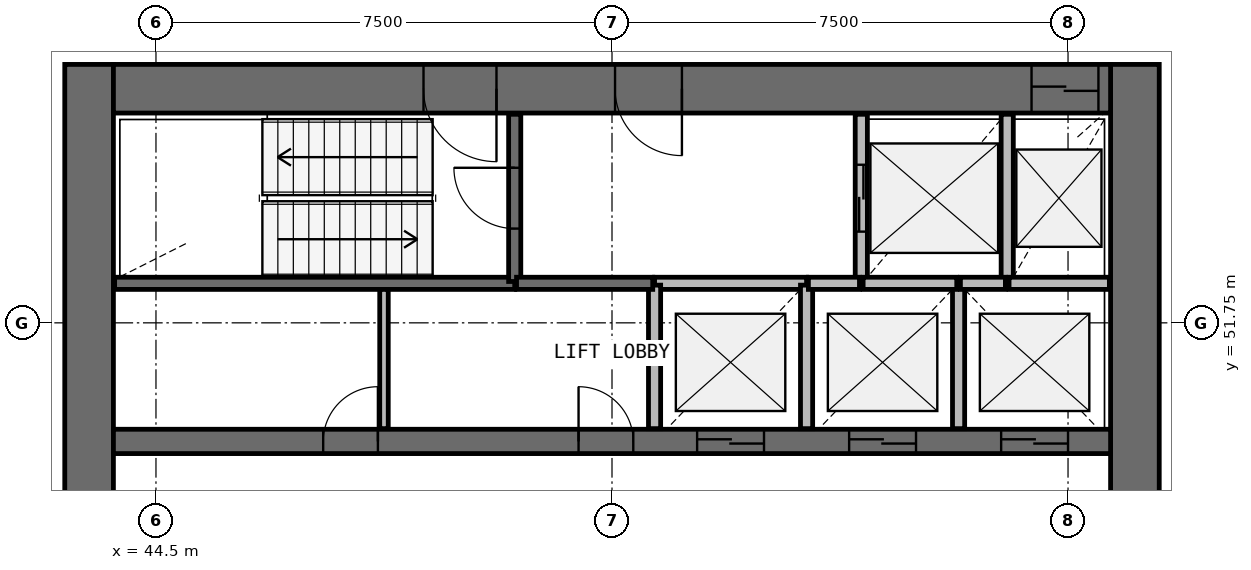
"""IFC4 building model, lengths in metres.
Left out: names, types, materials, properties, quantities, classifications, styles, units other than length and angle.
Written with IfcOpenShell. Run it as: python <this file> out.ifc"""

import sys

from ifc_helpers import new_model, si_unit, direction, frame, frame_2d, origin, place, context, subcontext, project, spatial, rectangle, extrude, source, transform, mapped, element, fill, save


model = new_model("IFC4")
c1 = context("Model", 3, precision=1e-05, world=origin(), true_north=direction((0.0, 1.0)))
c2 = subcontext(c1, "Body", "Model", "MODEL_VIEW")
j1 = project(units=[si_unit("LENGTHUNIT", "METRE"), si_unit("PLANEANGLEUNIT", "RADIAN")], contexts=[c1])
p1 = place(None, origin())
s1 = spatial("IfcSite", under=j1, at=p1, CompositionType="ELEMENT")
p2 = place(p1, origin())
s2 = spatial("IfcBuilding", under=s1, at=p2, CompositionType="ELEMENT")
p3 = place(p2, frame((0.0, 0.0, 156.5)))
s3 = spatial("IfcBuildingStorey", under=s2, at=p3, CompositionType="ELEMENT", Elevation=156.5)
p4 = place(p3, frame((60.6, 40.0, 0.0), z_axis=(0.0, 0.0, 1.0), x_axis=(0.0, 1.0, 0.0)))
e1 = element("IfcWall", 1, at=p4, inside=s3, PredefinedType="SHEAR", context=c2, shape_type="SweptSolid", body=[
    extrude(rectangle(XDim=16.0, YDim=0.8, at=frame_2d((8.0, 0.0))), origin(), (0.0, 0.0, 1.0), 3.9),
])
p5 = place(p4, frame((7.1, 0.0, 0.0)))
e2 = element("IfcOpeningElement", 2, at=p5, cuts=e1, PredefinedType="OPENING", context=c2, shape_type="SweptSolid", body=[
    extrude(rectangle(XDim=1.8, YDim=2.1, at=frame_2d((0.9, 1.05))), frame((0.0, 0.41, 0.0), z_axis=(0.0, -1.0, 0.0), x_axis=(1.0, 0.0, 0.0)), (0.0, 0.0, 1.0), 0.82),
])
p6 = place(p3, frame((43.4, 56.0, 0.0), z_axis=(0.0, 0.0, 1.0), x_axis=(0.0, -1.0, 0.0)))
e3 = element("IfcWall", 3, at=p6, inside=s3, PredefinedType="SHEAR", context=c2, shape_type="SweptSolid", body=[
    extrude(rectangle(XDim=16.0, YDim=0.8, at=frame_2d((8.0, 0.0))), origin(), (0.0, 0.0, 1.0), 3.9),
])
p7 = place(p6, frame((7.1, 0.0, 0.0)))
e4 = element("IfcOpeningElement", 4, at=p7, cuts=e3, PredefinedType="OPENING", context=c2, shape_type="SweptSolid", body=[
    extrude(rectangle(XDim=1.8, YDim=2.1, at=frame_2d((0.9, 1.05))), frame((0.0, 0.41, 0.0), z_axis=(0.0, -1.0, 0.0), x_axis=(1.0, 0.0, 0.0)), (0.0, 0.0, 1.0), 0.82),
])
p8 = place(p3, frame((60.2, 55.6, 0.0), z_axis=(0.0, 0.0, 1.0), x_axis=(-1.0, 0.0, 0.0)))
e5 = element("IfcWall", 5, at=p8, inside=s3, PredefinedType="SHEAR", context=c2, shape_type="SweptSolid", body=[
    extrude(rectangle(XDim=16.4, YDim=0.8, at=frame_2d((8.2, 0.0))), origin(), (0.0, 0.0, 1.0), 3.9),
])
p9 = place(p8, frame((0.2, 0.0, 0.0)))
e6 = element("IfcOpeningElement", 6, at=p9, cuts=e5, PredefinedType="OPENING", context=c2, shape_type="SweptSolid", body=[
    extrude(rectangle(XDim=1.1, YDim=2.1, at=frame_2d((0.55, 1.05))), frame((0.0, 0.41, 0.0), z_axis=(0.0, -1.0, 0.0), x_axis=(1.0, 0.0, 0.0)), (0.0, 0.0, 1.0), 0.82),
])
p10 = place(p8, frame((10.1, 0.0, 0.0)))
e7 = element("IfcOpeningElement", 7, at=p10, cuts=e5, PredefinedType="OPENING", context=c2, shape_type="SweptSolid", body=[
    extrude(rectangle(XDim=1.2, YDim=2.1, at=frame_2d((0.6, 1.05))), frame((0.0, 0.41, 0.0), z_axis=(0.0, -1.0, 0.0), x_axis=(1.0, 0.0, 0.0)), (0.0, 0.0, 1.0), 0.82),
])
p11 = place(p8, frame((7.05, 0.0, 0.0)))
e8 = element("IfcOpeningElement", 8, at=p11, cuts=e5, PredefinedType="OPENING", context=c2, shape_type="SweptSolid", body=[
    extrude(rectangle(XDim=1.1, YDim=2.1, at=frame_2d((0.55, 1.05))), frame((0.0, 0.41, 0.0), z_axis=(0.0, -1.0, 0.0), x_axis=(1.0, 0.0, 0.0)), (0.0, 0.0, 1.0), 0.82),
])
p12 = place(p3, frame((43.8, 49.8, 0.0), z_axis=(0.0, 0.0, 1.0), x_axis=(1.0, 0.0, 0.0)))
e9 = element("IfcWall", 9, at=p12, inside=s3, PredefinedType="SHEAR", context=c2, shape_type="SweptSolid", body=[
    extrude(rectangle(XDim=16.4, YDim=0.4, at=frame_2d((8.2, 0.0))), origin(), (0.0, 0.0, 1.0), 3.9),
])
p13 = place(p12, frame((9.6, 0.0, 0.0)))
e10 = element("IfcOpeningElement", 10, at=p13, cuts=e9, PredefinedType="OPENING", context=c2, shape_type="SweptSolid", body=[
    extrude(rectangle(XDim=1.1, YDim=2.1, at=frame_2d((0.55, 1.05))), frame((0.0, 0.21, 0.0), z_axis=(0.0, -1.0, 0.0), x_axis=(1.0, 0.0, 0.0)), (0.0, 0.0, 1.0), 0.42),
])
p14 = place(p12, frame((12.1, 0.0, 0.0)))
e11 = element("IfcOpeningElement", 11, at=p14, cuts=e9, PredefinedType="OPENING", context=c2, shape_type="SweptSolid", body=[
    extrude(rectangle(XDim=1.1, YDim=2.1, at=frame_2d((0.55, 1.05))), frame((0.0, 0.21, 0.0), z_axis=(0.0, -1.0, 0.0), x_axis=(1.0, 0.0, 0.0)), (0.0, 0.0, 1.0), 0.42),
])
p15 = place(p12, frame((14.6, 0.0, 0.0)))
e12 = element("IfcOpeningElement", 12, at=p15, cuts=e9, PredefinedType="OPENING", context=c2, shape_type="SweptSolid", body=[
    extrude(rectangle(XDim=1.1, YDim=2.1, at=frame_2d((0.55, 1.05))), frame((0.0, 0.21, 0.0), z_axis=(0.0, -1.0, 0.0), x_axis=(1.0, 0.0, 0.0)), (0.0, 0.0, 1.0), 0.42),
])
p16 = place(p12, frame((3.45, 0.0, 0.0)))
e13 = element("IfcOpeningElement", 13, at=p16, cuts=e9, PredefinedType="OPENING", context=c2, shape_type="SweptSolid", body=[
    extrude(rectangle(XDim=0.9, YDim=2.1, at=frame_2d((0.45, 1.05))), frame((0.0, 0.21, 0.0), z_axis=(0.0, -1.0, 0.0), x_axis=(1.0, 0.0, 0.0)), (0.0, 0.0, 1.0), 0.42),
])
p17 = place(p12, frame((7.65, 0.0, 0.0)))
e14 = element("IfcOpeningElement", 14, at=p17, cuts=e9, PredefinedType="OPENING", context=c2, shape_type="SweptSolid", body=[
    extrude(rectangle(XDim=0.9, YDim=2.1, at=frame_2d((0.45, 1.05))), frame((0.0, 0.21, 0.0), z_axis=(0.0, -1.0, 0.0), x_axis=(1.0, 0.0, 0.0)), (0.0, 0.0, 1.0), 0.42),
])
p18 = place(p3, frame((43.82, 52.4, 0.0), z_axis=(0.0, 0.0, 1.0), x_axis=(1.0, 0.0, 0.0)))
e15 = element("IfcWall", 15, at=p18, inside=s3, PredefinedType="SOLIDWALL", context=c2, shape_type="SweptSolid", body=[
    extrude(rectangle(XDim=6.58, YDim=0.2, at=frame_2d((3.29, 0.0))), origin(), (0.0, 0.0, 1.0), 3.58),
])
p19 = place(p3, frame((50.4, 52.43, 0.0), z_axis=(0.0, 0.0, 1.0), x_axis=(0.0, 1.0, 0.0)))
e16 = element("IfcWall", 16, at=p19, inside=s3, PredefinedType="SOLIDWALL", context=c2, shape_type="SweptSolid", body=[
    extrude(rectangle(XDim=2.75, YDim=0.2, at=frame_2d((1.375, 0.0))), origin(), (0.0, 0.0, 1.0), 3.58),
])
p20 = place(p19, frame((0.87, 0.0, 0.0)))
e17 = element("IfcOpeningElement", 17, at=p20, cuts=e16, PredefinedType="OPENING", context=c2, shape_type="SweptSolid", body=[
    extrude(rectangle(XDim=1.0, YDim=2.1, at=frame_2d((0.5, 1.05))), frame((0.0, 0.11, 0.0), z_axis=(0.0, -1.0, 0.0), x_axis=(1.0, 0.0, 0.0)), (0.0, 0.0, 1.0), 0.22),
])
p21 = place(p3, frame((56.1, 55.18, 0.0), z_axis=(0.0, 0.0, 1.0), x_axis=(0.0, -1.0, 0.0)))
e18 = element("IfcWall", 18, at=p21, inside=s3, PredefinedType="SOLIDWALL", context=c2, shape_type="SweptSolid", body=[
    extrude(rectangle(XDim=2.78, YDim=0.2, at=frame_2d((1.39, 0.0))), origin(), (0.0, 0.0, 1.0), 3.58),
])
p22 = place(p21, frame((0.83, 0.0, 0.0)))
e19 = element("IfcOpeningElement", 19, at=p22, cuts=e18, PredefinedType="OPENING", context=c2, shape_type="SweptSolid", body=[
    extrude(rectangle(XDim=1.1, YDim=2.1, at=frame_2d((0.55, 1.05))), frame((0.0, 0.11, 0.0), z_axis=(0.0, -1.0, 0.0), x_axis=(1.0, 0.0, 0.0)), (0.0, 0.0, 1.0), 0.22),
])
p23 = place(p3, frame((58.5, 52.4, 0.0), z_axis=(0.0, 0.0, 1.0), x_axis=(0.0, 1.0, 0.0)))
e20 = element("IfcWall", 20, at=p23, inside=s3, PredefinedType="SOLIDWALL", context=c2, shape_type="SweptSolid", body=[
    extrude(rectangle(XDim=2.78, YDim=0.2, at=frame_2d((1.39, 0.0))), origin(), (0.0, 0.0, 1.0), 3.58),
])
p24 = place(p3, frame((55.2, 52.4, 0.0), z_axis=(0.0, 0.0, 1.0), x_axis=(-1.0, 0.0, 0.0)))
e21 = element("IfcWall", 21, at=p24, inside=s3, PredefinedType="SOLIDWALL", context=c2, shape_type="SweptSolid", body=[
    extrude(rectangle(XDim=2.5, YDim=0.2, at=frame_2d((1.25, 0.0))), origin(), (0.0, 0.0, 1.0), 3.58),
])
for number, where, z_axis, x_axis in (
    (22, (52.7, 52.37, 0.0), (0.0, 0.0, 1.0), (0.0, -1.0, 0.0)),
    (23, (55.2, 50.01, 0.0), (0.0, 0.0, 1.0), (0.0, 1.0, 0.0)),
):
    element("IfcWall", number, at=place(p3, frame(where, z_axis=z_axis, x_axis=x_axis)), inside=s3, PredefinedType="SOLIDWALL", context=c2, shape_type="SweptSolid", body=[
        extrude(rectangle(XDim=2.36, YDim=0.2, at=frame_2d((1.18, 0.0))), origin(), (0.0, 0.0, 1.0), 3.58),
    ])
p25 = place(p3, frame((57.7, 50.01, 0.0), z_axis=(0.0, 0.0, 1.0), x_axis=(0.0, 1.0, 0.0)))
e24 = element("IfcWall", 24, at=p25, inside=s3, PredefinedType="SOLIDWALL", context=c2, shape_type="SweptSolid", body=[
    extrude(rectangle(XDim=2.39, YDim=0.2, at=frame_2d((1.195, 0.0))), origin(), (0.0, 0.0, 1.0), 3.58),
])
p26 = place(p3, frame((50.43, 52.4, 0.0), z_axis=(0.0, 0.0, 1.0), x_axis=(1.0, 0.0, 0.0)))
e25 = element("IfcWall", 25, at=p26, inside=s3, PredefinedType="SOLIDWALL", context=c2, shape_type="SweptSolid", body=[
    extrude(rectangle(XDim=2.24, YDim=0.2, at=frame_2d((1.12, 0.0))), origin(), (0.0, 0.0, 1.0), 3.58),
])
p27 = place(p3, frame((60.18, 52.4, 0.0), z_axis=(0.0, 0.0, 1.0), x_axis=(-1.0, 0.0, 0.0)))
e26 = element("IfcWall", 26, at=p27, inside=s3, PredefinedType="SOLIDWALL", context=c2, shape_type="SweptSolid", body=[
    extrude(rectangle(XDim=1.65, YDim=0.2, at=frame_2d((0.825, 0.0))), origin(), (0.0, 0.0, 1.0), 3.58),
])
p28 = place(p3, frame((57.67, 52.4, 0.0), z_axis=(0.0, 0.0, 1.0), x_axis=(-1.0, 0.0, 0.0)))
e27 = element("IfcWall", 27, at=p28, inside=s3, PredefinedType="SOLIDWALL", context=c2, shape_type="SweptSolid", body=[
    extrude(rectangle(XDim=1.54, YDim=0.2, at=frame_2d((0.77, 0.0))), origin(), (0.0, 0.0, 1.0), 3.58),
])
p29 = place(p3, frame((56.07, 52.4, 0.0), z_axis=(0.0, 0.0, 1.0), x_axis=(-1.0, 0.0, 0.0)))
e28 = element("IfcWall", 28, at=p29, inside=s3, PredefinedType="SOLIDWALL", context=c2, shape_type="SweptSolid", body=[
    extrude(rectangle(XDim=0.84, YDim=0.2, at=frame_2d((0.42, 0.0))), origin(), (0.0, 0.0, 1.0), 3.58),
])
p30 = place(p3, frame((58.47, 52.4, 0.0), z_axis=(0.0, 0.0, 1.0), x_axis=(-1.0, 0.0, 0.0)))
e29 = element("IfcWall", 29, at=p30, inside=s3, PredefinedType="SOLIDWALL", context=c2, shape_type="SweptSolid", body=[
    extrude(rectangle(XDim=0.74, YDim=0.2, at=frame_2d((0.37, 0.0))), origin(), (0.0, 0.0, 1.0), 3.58),
])
p31 = place(p3, frame((48.25, 50.01, 0.0), z_axis=(0.0, 0.0, 1.0), x_axis=(0.0, 1.0, 0.0)))
e30 = element("IfcWall", 30, at=p31, inside=s3, PredefinedType="PARTITIONING", context=c2, shape_type="SweptSolid", body=[
    extrude(rectangle(XDim=2.29, YDim=0.14, at=frame_2d((1.145, 0.0))), origin(), (0.0, 0.0, 1.0), 2.88),
])
m1 = source(origin(), c2, "Body", "SweptSolid", [
    extrude(rectangle(XDim=1.1, YDim=2.1, at=frame_2d((0.55, 1.05))), frame((0.0, 0.025, 0.0), z_axis=(0.0, -1.0, 0.0), x_axis=(1.0, 0.0, 0.0)), (0.0, 0.0, 1.0), 0.05),
])
p32 = place(p13, origin())
e31 = element("IfcDoor", 31, at=p32, inside=s3, OperationType="DOUBLE_DOOR_SLIDING", PredefinedType="USERDEFINED", context=c2, shape_type="MappedRepresentation", body=[
    mapped(m1, transform((0.0, 0.0, 0.0), scale=1.0)),
])
fill(e10, e31)
p33 = place(p14, origin())
e32 = element("IfcDoor", 32, at=p33, inside=s3, OperationType="DOUBLE_DOOR_SLIDING", PredefinedType="USERDEFINED", context=c2, shape_type="MappedRepresentation", body=[
    mapped(m1, transform((0.0, 0.0, 0.0), scale=1.0)),
])
fill(e11, e32)
p34 = place(p15, origin())
e33 = element("IfcDoor", 33, at=p34, inside=s3, OperationType="DOUBLE_DOOR_SLIDING", PredefinedType="USERDEFINED", context=c2, shape_type="MappedRepresentation", body=[
    mapped(m1, transform((0.0, 0.0, 0.0), scale=1.0)),
])
fill(e12, e33)
p35 = place(p22, origin())
e34 = element("IfcDoor", 34, at=p35, inside=s3, OperationType="DOUBLE_DOOR_SLIDING", PredefinedType="USERDEFINED", context=c2, shape_type="MappedRepresentation", body=[
    mapped(m1, transform((0.0, 0.0, 0.0), scale=1.0)),
])
fill(e19, e34)
p36 = place(p9, origin())
e35 = element("IfcDoor", 35, at=p36, inside=s3, OperationType="DOUBLE_DOOR_SLIDING", PredefinedType="USERDEFINED", context=c2, shape_type="MappedRepresentation", body=[
    mapped(m1, transform((0.0, 0.0, 0.0), scale=1.0)),
])
fill(e6, e35)
m2 = source(origin(), c2, "Body", "SweptSolid", [
    extrude(rectangle(XDim=1.2, YDim=2.1, at=frame_2d((0.6, 1.05))), frame((0.0, 0.025, 0.0), z_axis=(0.0, -1.0, 0.0), x_axis=(1.0, 0.0, 0.0)), (0.0, 0.0, 1.0), 0.05),
])
p37 = place(p10, origin())
e36 = element("IfcDoor", 36, at=p37, inside=s3, OperationType="SINGLE_SWING_LEFT", PredefinedType="DOOR", context=c2, shape_type="MappedRepresentation", body=[
    mapped(m2, transform((0.0, 0.0, 0.0), scale=1.0)),
])
fill(e7, e36)
m3 = source(origin(), c2, "Body", "SweptSolid", [
    extrude(rectangle(XDim=1.0, YDim=2.1, at=frame_2d((0.5, 1.05))), frame((0.0, 0.025, 0.0), z_axis=(0.0, -1.0, 0.0), x_axis=(1.0, 0.0, 0.0)), (0.0, 0.0, 1.0), 0.05),
])
p38 = place(p20, origin())
e37 = element("IfcDoor", 37, at=p38, inside=s3, OperationType="SINGLE_SWING_RIGHT", PredefinedType="DOOR", context=c2, shape_type="MappedRepresentation", body=[
    mapped(m3, transform((0.0, 0.0, 0.0), scale=1.0)),
])
fill(e17, e37)
m4 = source(origin(), c2, "Body", "SweptSolid", [
    extrude(rectangle(XDim=1.1, YDim=2.1, at=frame_2d((0.55, 1.05))), frame((0.0, 0.025, 0.0), z_axis=(0.0, -1.0, 0.0), x_axis=(1.0, 0.0, 0.0)), (0.0, 0.0, 1.0), 0.05),
])
p39 = place(p11, origin())
e38 = element("IfcDoor", 38, at=p39, inside=s3, OperationType="SINGLE_SWING_LEFT", PredefinedType="DOOR", context=c2, shape_type="MappedRepresentation", body=[
    mapped(m4, transform((0.0, 0.0, 0.0), scale=1.0)),
])
fill(e8, e38)
m5 = source(origin(), c2, "Body", "SweptSolid", [
    extrude(rectangle(XDim=0.9, YDim=2.1, at=frame_2d((0.45, 1.05))), frame((0.0, 0.025, 0.0), z_axis=(0.0, -1.0, 0.0), x_axis=(1.0, 0.0, 0.0)), (0.0, 0.0, 1.0), 0.05),
])
p40 = place(p16, origin())
e39 = element("IfcDoor", 39, at=p40, inside=s3, OperationType="SINGLE_SWING_RIGHT", PredefinedType="DOOR", context=c2, shape_type="MappedRepresentation", body=[
    mapped(m5, transform((0.0, 0.0, 0.0), scale=1.0)),
])
fill(e13, e39)
p41 = place(p17, origin())
e40 = element("IfcDoor", 40, at=p41, inside=s3, OperationType="SINGLE_SWING_LEFT", PredefinedType="DOOR", context=c2, shape_type="MappedRepresentation", body=[
    mapped(m5, transform((0.0, 0.0, 0.0), scale=1.0)),
])
fill(e14, e40)
save(model, sys.argv[1])
